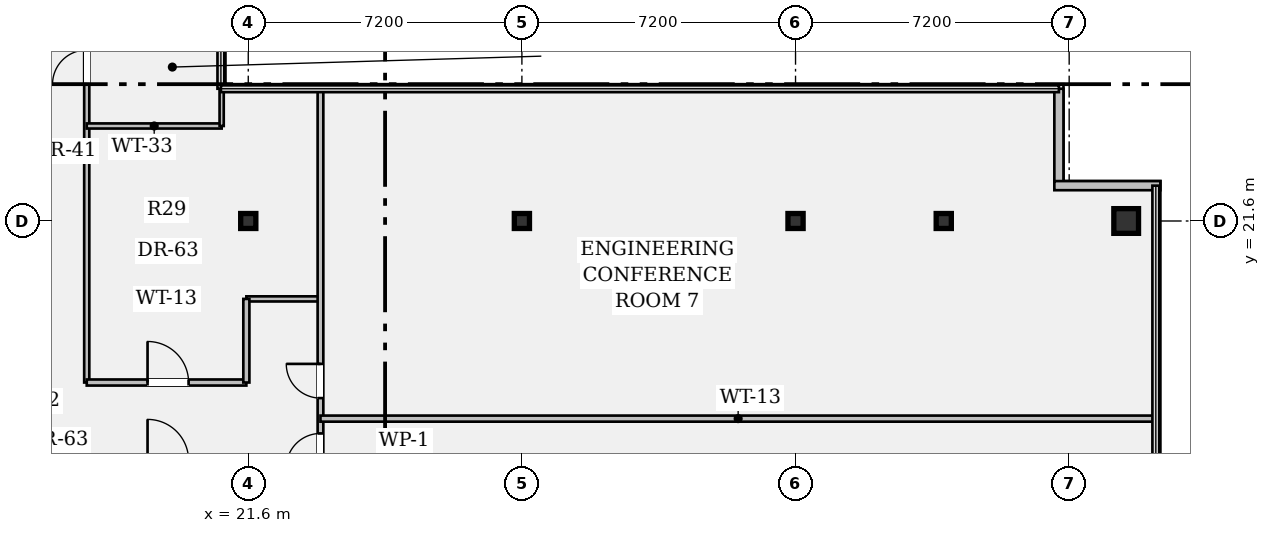
"""IFC4 building model, lengths in metres.
Left out: names, types, materials, properties, quantities, classifications, styles, units other than length and angle.
Written with IfcOpenShell. Run it as: python <this file> out.ifc"""

import sys

from ifc_helpers import new_model, si_unit, direction, frame, frame_2d, origin, origin_2d, place, context, subcontext, project, spatial, rectangle, hollow_rectangle, i_section, extrude, element, fill, save


model = new_model("IFC4")
c1 = context("Model", 3, precision=1e-05, world=origin(), true_north=direction((0.0, 1.0)))
c2 = subcontext(c1, "Body", "Model", "MODEL_VIEW")
j1 = project(units=[si_unit("LENGTHUNIT", "METRE"), si_unit("PLANEANGLEUNIT", "RADIAN")], contexts=[c1])
p1 = place(None, origin())
s1 = spatial("IfcSite", under=j1, at=p1, CompositionType="ELEMENT")
p2 = place(p1, origin())
s2 = spatial("IfcBuilding", under=s1, at=p2, CompositionType="ELEMENT")
p3 = place(p2, frame((0.0, 0.0, 251.65)))
s3 = spatial("IfcBuildingStorey", under=s2, at=p3, CompositionType="ELEMENT", Elevation=251.65)
for number, where, z_axis, x_axis in (
    (1, (21.6, 21.6, 0.0), (0.0, 0.0, 1.0), (1.0, 0.0, 0.0)),
    (2, (28.8, 21.6, 0.0), (0.0, 0.0, 1.0), (1.0, 0.0, 0.0)),
    (3, (36.0, 21.6, 0.0), (0.0, 0.0, 1.0), (1.0, 0.0, 0.0)),
    (4, (39.9, 21.6, 0.0), (0.0, 0.0, 1.0), (1.0, 0.0, 0.0)),
):
    element("IfcColumn", number, at=place(p3, frame(where, z_axis=z_axis, x_axis=x_axis)), inside=s3, PredefinedType="COLUMN", context=c2, shape_type="SweptSolid", body=[
        extrude(i_section(OverallWidth=0.399, OverallDepth=0.394, WebThickness=0.023, FlangeThickness=0.037, FilletRadius=0.018, at=origin_2d()), origin(), (0.0, 0.0, 1.0), 3.24),
    ])
p4 = place(p3, frame((44.7, 21.6, 0.0), z_axis=(0.0, 0.0, 1.0), x_axis=(1.0, 0.0, 0.0)))
e5 = element("IfcColumn", 5, at=p4, inside=s3, PredefinedType="COLUMN", context=c2, shape_type="SweptSolid", body=[
    extrude(hollow_rectangle(XDim=0.65, YDim=0.65, WallThickness=0.04, at=origin_2d()), origin(), (0.0, 0.0, 1.0), 3.24),
])
p5 = place(p3, frame((42.93, 25.08, 0.0), z_axis=(0.0, 0.0, 1.0), x_axis=(0.0, -1.0, 0.0)))
e6 = element("IfcWall", 6, at=p5, inside=s3, PredefinedType="STANDARD", context=c2, shape_type="SweptSolid", body=[
    extrude(rectangle(XDim=2.55, YDim=0.24, at=frame_2d((1.275, 0.0))), origin(), (0.0, 0.0, 1.0), 3.24),
])
p6 = place(p3, frame((42.81, 22.53, 0.0), z_axis=(0.0, 0.0, 1.0), x_axis=(1.0, 0.0, 0.0)))
e7 = element("IfcWall", 7, at=p6, inside=s3, PredefinedType="STANDARD", context=c2, shape_type="SweptSolid", body=[
    extrude(rectangle(XDim=2.79, YDim=0.24, at=frame_2d((1.395, 0.0))), origin(), (0.0, 0.0, 1.0), 3.24),
])
p7 = place(p3, frame((17.35, 17.35, 0.0), z_axis=(0.0, 0.0, 1.0), x_axis=(0.0, 1.0, 0.0)))
e8 = element("IfcWall", 8, at=p7, inside=s3, PredefinedType="PARTITIONING", context=c2, shape_type="SweptSolid", body=[
    extrude(rectangle(XDim=18.55, YDim=0.135, at=frame_2d((9.275, 0.0))), origin(), (0.0, 0.0, 1.0), 2.676),
])
p8 = place(p7, frame((7.85, 0.0, 0.0)))
e9 = element("IfcOpeningElement", 9, at=p8, cuts=e8, PredefinedType="OPENING", context=c2, shape_type="SweptSolid", body=[
    extrude(rectangle(XDim=0.9, YDim=2.15, at=frame_2d((0.45, 1.075))), frame((0.0, 0.08, 0.0), z_axis=(0.0, -1.0, 0.0), x_axis=(1.0, 0.0, 0.0)), (0.0, 0.0, 1.0), 0.159),
])
p9 = place(p7, frame((10.75, 0.0, 0.0)))
e10 = element("IfcOpeningElement", 10, at=p9, cuts=e8, PredefinedType="OPENING", context=c2, shape_type="SweptSolid", body=[
    extrude(rectangle(XDim=0.9, YDim=2.15, at=frame_2d((0.45, 1.075))), frame((0.0, 0.08, 0.0), z_axis=(0.0, -1.0, 0.0), x_axis=(1.0, 0.0, 0.0)), (0.0, 0.0, 1.0), 0.159),
])
p10 = place(p7, frame((13.65, 0.0, 0.0)))
e11 = element("IfcOpeningElement", 11, at=p10, cuts=e8, PredefinedType="OPENING", context=c2, shape_type="SweptSolid", body=[
    extrude(rectangle(XDim=0.9, YDim=2.15, at=frame_2d((0.45, 1.075))), frame((0.0, 0.08, 0.0), z_axis=(0.0, -1.0, 0.0), x_axis=(1.0, 0.0, 0.0)), (0.0, 0.0, 1.0), 0.159),
])
p11 = place(p7, frame((16.55, 0.0, 0.0)))
e12 = element("IfcOpeningElement", 12, at=p11, cuts=e8, PredefinedType="OPENING", context=c2, shape_type="SweptSolid", body=[
    extrude(rectangle(XDim=0.9, YDim=2.15, at=frame_2d((0.45, 1.075))), frame((0.0, 0.08, 0.0), z_axis=(0.0, -1.0, 0.0), x_axis=(1.0, 0.0, 0.0)), (0.0, 0.0, 1.0), 0.159),
])
p12 = place(p3, frame((17.35, 17.35, 0.0), z_axis=(0.0, 0.0, 1.0), x_axis=(1.0, 0.0, 0.0)))
e13 = element("IfcWall", 13, at=p12, inside=s3, PredefinedType="PARTITIONING", context=c2, shape_type="SweptSolid", body=[
    extrude(rectangle(XDim=4.2, YDim=0.16, at=frame_2d((2.1, 0.0))), origin(), (0.0, 0.0, 1.0), 2.808),
])
p13 = place(p12, frame((1.6, 0.0, 0.0)))
e14 = element("IfcOpeningElement", 14, at=p13, cuts=e13, PredefinedType="OPENING", context=c2, shape_type="SweptSolid", body=[
    extrude(rectangle(XDim=1.08, YDim=2.15, at=frame_2d((0.54, 1.075))), frame((0.0, 0.092, 0.0), z_axis=(0.0, -1.0, 0.0), x_axis=(1.0, 0.0, 0.0)), (0.0, 0.0, 1.0), 0.184),
])
p14 = place(p3, frame((21.55, 19.55, 0.0), z_axis=(0.0, 0.0, 1.0), x_axis=(1.0, 0.0, 0.0)))
e15 = element("IfcWall", 15, at=p14, inside=s3, PredefinedType="PARTITIONING", context=c2, shape_type="SweptSolid", body=[
    extrude(rectangle(XDim=1.95, YDim=0.135, at=frame_2d((0.975, 0.0))), origin(), (0.0, 0.0, 1.0), 2.676),
])
p15 = place(p3, frame((21.55, 17.35, 0.0), z_axis=(0.0, 0.0, 1.0), x_axis=(0.0, 1.0, 0.0)))
e16 = element("IfcWall", 16, at=p15, inside=s3, PredefinedType="PARTITIONING", context=c2, shape_type="SweptSolid", body=[
    extrude(rectangle(XDim=2.2, YDim=0.16, at=frame_2d((1.1, 0.0))), origin(), (0.0, 0.0, 1.0), 2.676),
])
p16 = place(p3, frame((23.5, 6.52, 0.0), z_axis=(0.0, 0.0, 1.0), x_axis=(0.0, 1.0, 0.0)))
e17 = element("IfcWall", 17, at=p16, inside=s3, PredefinedType="PARTITIONING", context=c2, shape_type="SweptSolid", body=[
    extrude(rectangle(XDim=18.56, YDim=0.15, at=frame_2d((9.28, 0.0))), origin(), (0.0, 0.0, 1.0), 2.676),
])
p17 = place(p16, frame((8.59, 0.0, 0.0)))
e18 = element("IfcOpeningElement", 18, at=p17, cuts=e17, PredefinedType="OPENING", context=c2, shape_type="SweptSolid", body=[
    extrude(rectangle(XDim=0.9, YDim=2.15, at=frame_2d((0.45, 1.075))), frame((0.0, 0.087, 0.0), z_axis=(0.0, -1.0, 0.0), x_axis=(1.0, 0.0, 0.0)), (0.0, 0.0, 1.0), 0.174),
])
p18 = place(p16, frame((10.42, 0.0, 0.0)))
e19 = element("IfcOpeningElement", 19, at=p18, cuts=e17, PredefinedType="OPENING", context=c2, shape_type="SweptSolid", body=[
    extrude(rectangle(XDim=0.9, YDim=2.15, at=frame_2d((0.45, 1.075))), frame((0.0, 0.087, 0.0), z_axis=(0.0, -1.0, 0.0), x_axis=(1.0, 0.0, 0.0)), (0.0, 0.0, 1.0), 0.174),
])
p19 = place(p3, frame((17.35, 24.1, 0.0), z_axis=(0.0, 0.0, 1.0), x_axis=(1.0, 0.0, 0.0)))
e20 = element("IfcWall", 20, at=p19, inside=s3, PredefinedType="PARTITIONING", context=c2, shape_type="SweptSolid", body=[
    extrude(rectangle(XDim=3.55, YDim=0.135, at=frame_2d((1.775, 0.0))), origin(), (0.0, 0.0, 1.0), 2.808),
])
p20 = place(p3, frame((20.9, 24.1, 0.0), z_axis=(0.0, 0.0, 1.0), x_axis=(0.0, 1.0, 0.0)))
e21 = element("IfcWall", 21, at=p20, inside=s3, PredefinedType="PARTITIONING", context=c2, shape_type="SweptSolid", body=[
    extrude(rectangle(XDim=11.8, YDim=0.11, at=frame_2d((5.9, 0.0))), origin(), (0.0, 0.0, 1.0), 3.24),
])
p21 = place(p3, frame((23.5, 16.4, 0.0), z_axis=(0.0, 0.0, 1.0), x_axis=(1.0, 0.0, 0.0)))
e22 = element("IfcWall", 22, at=p21, inside=s3, PredefinedType="PARTITIONING", context=c2, shape_type="SweptSolid", body=[
    extrude(rectangle(XDim=21.98, YDim=0.16, at=frame_2d((10.99, 0.0))), origin(), (0.0, 0.0, 1.0), 2.676),
])
p22 = place(p8, origin())
e23 = element("IfcDoor", 23, at=p22, inside=s3, OperationType="SINGLE_SWING_LEFT", PredefinedType="DOOR", context=c2, shape_type="SweptSolid", body=[
    extrude(rectangle(XDim=0.9, YDim=2.15, at=frame_2d((0.45, 1.075))), frame((0.0, 0.025, 0.0), z_axis=(0.0, -1.0, 0.0), x_axis=(1.0, 0.0, 0.0)), (0.0, 0.0, 1.0), 0.05),
])
fill(e9, e23)
p23 = place(p13, origin())
e24 = element("IfcDoor", 24, at=p23, inside=s3, OperationType="SINGLE_SWING_LEFT", PredefinedType="DOOR", context=c2, shape_type="SweptSolid", body=[
    extrude(rectangle(XDim=1.08, YDim=2.15, at=frame_2d((0.54, 1.075))), frame((0.0, 0.025, 0.0), z_axis=(0.0, -1.0, 0.0), x_axis=(1.0, 0.0, 0.0)), (0.0, 0.0, 1.0), 0.05),
])
fill(e14, e24)
p24 = place(p17, origin())
e25 = element("IfcDoor", 25, at=p24, inside=s3, OperationType="SINGLE_SWING_LEFT", PredefinedType="DOOR", context=c2, shape_type="SweptSolid", body=[
    extrude(rectangle(XDim=0.9, YDim=2.15, at=frame_2d((0.45, 1.075))), frame((0.0, 0.025, 0.0), z_axis=(0.0, -1.0, 0.0), x_axis=(1.0, 0.0, 0.0)), (0.0, 0.0, 1.0), 0.05),
])
fill(e18, e25)
p25 = place(p18, origin())
e26 = element("IfcDoor", 26, at=p25, inside=s3, OperationType="SINGLE_SWING_RIGHT", PredefinedType="DOOR", context=c2, shape_type="SweptSolid", body=[
    extrude(rectangle(XDim=0.9, YDim=2.15, at=frame_2d((0.45, 1.075))), frame((0.0, 0.025, 0.0), z_axis=(0.0, -1.0, 0.0), x_axis=(1.0, 0.0, 0.0)), (0.0, 0.0, 1.0), 0.05),
])
fill(e19, e26)
save(model, sys.argv[1])
